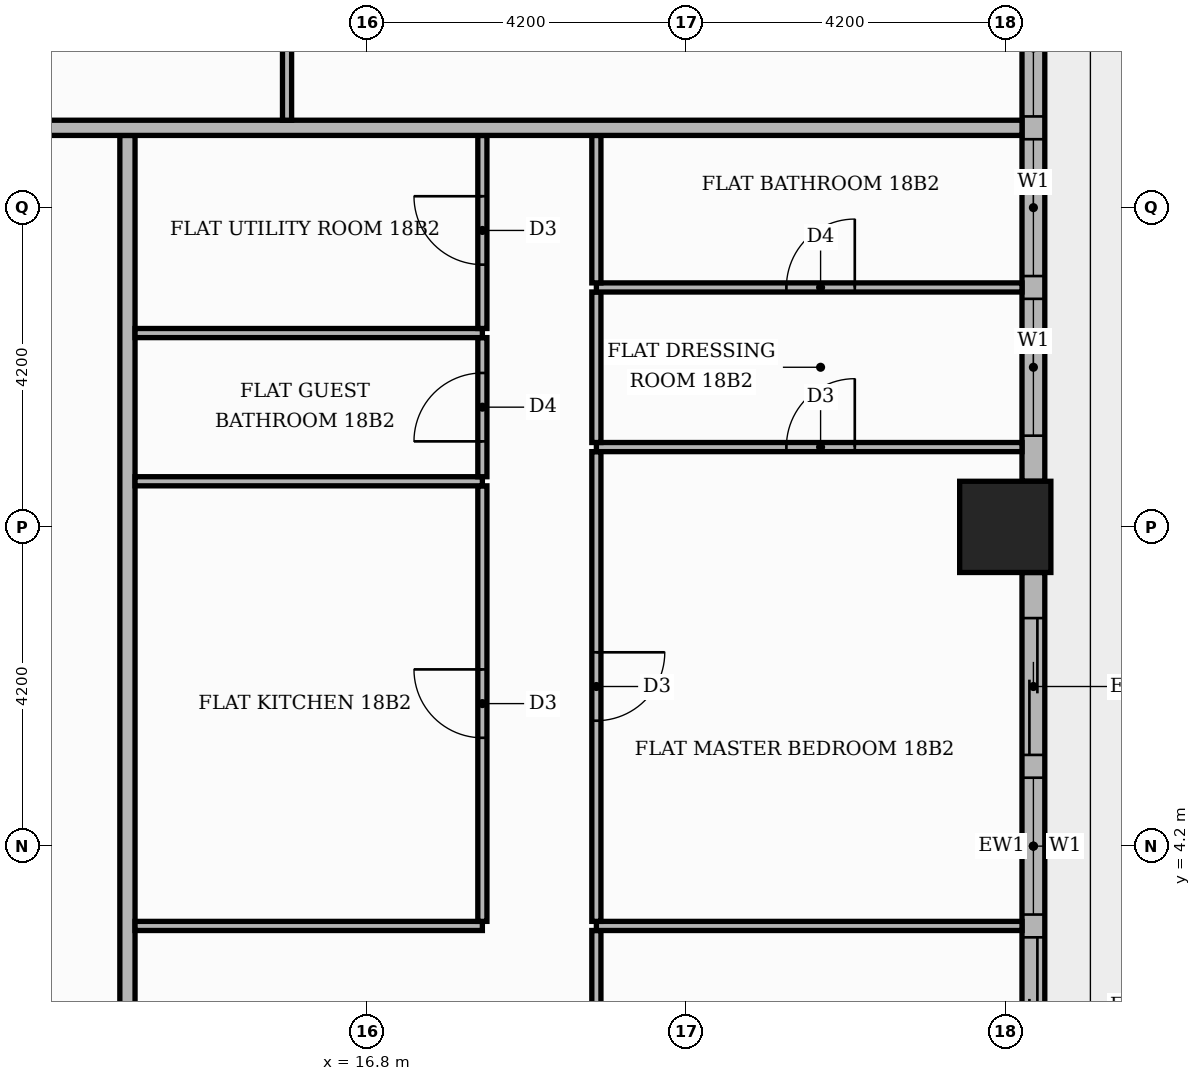
"""IFC4 building model, lengths in metres.
Left out: names, types, materials, properties, quantities, classifications, styles, units other than length and angle.
Written with IfcOpenShell. Run it as: python <this file> out.ifc"""

import sys

from ifc_helpers import new_model, si_unit, direction, frame, frame_2d, origin, origin_2d, place, context, subcontext, project, spatial, rectangle, extrude, element, fill, save


model = new_model("IFC4")
c1 = context("Model", 3, precision=1e-05, world=origin(), true_north=direction((0.0, 1.0)))
c2 = subcontext(c1, "Body", "Model", "MODEL_VIEW")
j1 = project(units=[si_unit("LENGTHUNIT", "METRE"), si_unit("PLANEANGLEUNIT", "RADIAN")], contexts=[c1])
p1 = place(None, origin())
s1 = spatial("IfcSite", under=j1, at=p1, CompositionType="ELEMENT")
p2 = place(p1, origin())
s2 = spatial("IfcBuilding", under=s1, at=p2, CompositionType="ELEMENT")
p3 = place(p2, frame((0.0, 0.0, 79.2)))
s3 = spatial("IfcBuildingStorey", under=s2, at=p3, CompositionType="ELEMENT", Elevation=79.2)
p4 = place(p3, frame((25.2, 8.4, 0.0), z_axis=(0.0, 0.0, 1.0), x_axis=(1.0, 0.0, 0.0)))
e1 = element("IfcColumn", 1, at=p4, inside=s3, PredefinedType="COLUMN", context=c2, shape_type="SweptSolid", body=[
    extrude(rectangle(XDim=1.2, YDim=1.2, at=origin_2d()), origin(), (0.0, 0.0, 1.0), 3.9),
])
p5 = place(p3, frame((25.57, 0.6, 0.0), z_axis=(0.0, 0.0, 1.0), x_axis=(0.0, 1.0, 0.0)))
e2 = element("IfcWall", 2, at=p5, inside=s3, PredefinedType="STANDARD", context=c2, shape_type="SweptSolid", body=[
    extrude(rectangle(XDim=7.2, YDim=0.3, at=frame_2d((3.6, 0.0))), origin(), (0.0, 0.0, 1.0), 3.48),
])
p6 = place(p5, frame((0.6, 0.0, 0.0)))
e3 = element("IfcOpeningElement", 3, at=p6, cuts=e2, PredefinedType="OPENING", context=c2, shape_type="SweptSolid", body=[
    extrude(rectangle(XDim=1.8, YDim=2.4, at=frame_2d((0.9, 1.2))), frame((0.0, 0.16, 0.0), z_axis=(0.0, -1.0, 0.0), x_axis=(1.0, 0.0, 0.0)), (0.0, 0.0, 1.0), 0.32),
])
p7 = place(p5, frame((2.7, 0.0, 0.9)))
e4 = element("IfcOpeningElement", 4, at=p7, cuts=e2, PredefinedType="OPENING", context=c2, shape_type="SweptSolid", body=[
    extrude(rectangle(XDim=1.8, YDim=2.1, at=frame_2d((0.9, 1.05))), frame((0.0, 0.16, 0.0), z_axis=(0.0, -1.0, 0.0), x_axis=(1.0, 0.0, 0.0)), (0.0, 0.0, 1.0), 0.32),
])
p8 = place(p5, frame((4.8, 0.0, 0.0)))
e5 = element("IfcOpeningElement", 5, at=p8, cuts=e2, PredefinedType="OPENING", context=c2, shape_type="SweptSolid", body=[
    extrude(rectangle(XDim=1.8, YDim=2.4, at=frame_2d((0.9, 1.2))), frame((0.0, 0.16, 0.0), z_axis=(0.0, -1.0, 0.0), x_axis=(1.0, 0.0, 0.0)), (0.0, 0.0, 1.0), 0.32),
])
p9 = place(p3, frame((25.57, 9.0, 0.0), z_axis=(0.0, 0.0, 1.0), x_axis=(0.0, 1.0, 0.0)))
e6 = element("IfcWall", 6, at=p9, inside=s3, PredefinedType="STANDARD", context=c2, shape_type="SweptSolid", body=[
    extrude(rectangle(XDim=7.2, YDim=0.3, at=frame_2d((3.6, 0.0))), origin(), (0.0, 0.0, 1.0), 3.48),
])
p10 = place(p9, frame((0.6, 0.0, 0.9)))
e7 = element("IfcOpeningElement", 7, at=p10, cuts=e6, PredefinedType="OPENING", context=c2, shape_type="SweptSolid", body=[
    extrude(rectangle(XDim=1.8, YDim=2.1, at=frame_2d((0.9, 1.05))), frame((0.0, 0.16, 0.0), z_axis=(0.0, -1.0, 0.0), x_axis=(1.0, 0.0, 0.0)), (0.0, 0.0, 1.0), 0.32),
])
p11 = place(p9, frame((2.7, 0.0, 0.9)))
e8 = element("IfcOpeningElement", 8, at=p11, cuts=e6, PredefinedType="OPENING", context=c2, shape_type="SweptSolid", body=[
    extrude(rectangle(XDim=1.8, YDim=2.1, at=frame_2d((0.9, 1.05))), frame((0.0, 0.16, 0.0), z_axis=(0.0, -1.0, 0.0), x_axis=(1.0, 0.0, 0.0)), (0.0, 0.0, 1.0), 0.32),
])
p12 = place(p9, frame((4.8, 0.0, 0.9)))
e9 = element("IfcOpeningElement", 9, at=p12, cuts=e6, PredefinedType="OPENING", context=c2, shape_type="SweptSolid", body=[
    extrude(rectangle(XDim=1.8, YDim=2.1, at=frame_2d((0.9, 1.05))), frame((0.0, 0.16, 0.0), z_axis=(0.0, -1.0, 0.0), x_axis=(1.0, 0.0, 0.0)), (0.0, 0.0, 1.0), 0.32),
])
p13 = place(p3, frame((13.65, -5.15, 0.0), z_axis=(0.0, 0.0, 1.0), x_axis=(0.0, 1.0, 0.0)))
e10 = element("IfcWall", 10, at=p13, inside=s3, PredefinedType="PARTITIONING", context=c2, shape_type="SweptSolid", body=[
    extrude(rectangle(XDim=18.7, YDim=0.2, at=frame_2d((9.35, 0.0))), origin(), (0.0, 0.0, 1.0), 3.48),
])
p14 = place(p13, frame((5.65, 0.0, 0.0)))
e11 = element("IfcOpeningElement", 11, at=p14, cuts=e10, PredefinedType="OPENING", context=c2, shape_type="SweptSolid", body=[
    extrude(rectangle(XDim=1.1, YDim=2.4, at=frame_2d((0.55, 1.2))), frame((0.0, 0.11, 0.0), z_axis=(0.0, -1.0, 0.0), x_axis=(1.0, 0.0, 0.0)), (0.0, 0.0, 1.0), 0.22),
])
p15 = place(p3, frame((19.82, -5.15, 0.0), z_axis=(0.0, 0.0, 1.0), x_axis=(0.0, 1.0, 0.0)))
e12 = element("IfcWall", 12, at=p15, inside=s3, PredefinedType="PARTITIONING", context=c2, shape_type="SweptSolid", body=[
    extrude(rectangle(XDim=8.24, YDim=0.12, at=frame_2d((4.12, 0.0))), origin(), (0.0, 0.0, 1.0), 3.48),
])
p16 = place(p15, frame((3.6, 0.0, 0.0)))
e13 = element("IfcOpeningElement", 13, at=p16, cuts=e12, PredefinedType="OPENING", context=c2, shape_type="SweptSolid", body=[
    extrude(rectangle(XDim=1.0, YDim=2.1, at=frame_2d((0.5, 1.05))), frame((0.0, 0.07, 0.0), z_axis=(0.0, -1.0, 0.0), x_axis=(1.0, 0.0, 0.0)), (0.0, 0.0, 1.0), 0.14),
])
p17 = place(p3, frame((13.75, 3.15, 0.0), z_axis=(0.0, 0.0, 1.0), x_axis=(1.0, 0.0, 0.0)))
e14 = element("IfcWall", 14, at=p17, inside=s3, PredefinedType="PARTITIONING", context=c2, shape_type="SweptSolid", body=[
    extrude(rectangle(XDim=4.57, YDim=0.12, at=frame_2d((2.285, 0.0))), origin(), (0.0, 0.0, 1.0), 3.48),
])
p18 = place(p3, frame((19.82, 3.15, 0.0), z_axis=(0.0, 0.0, 1.0), x_axis=(1.0, 0.0, 0.0)))
e15 = element("IfcWall", 15, at=p18, inside=s3, PredefinedType="PARTITIONING", context=c2, shape_type="SweptSolid", body=[
    extrude(rectangle(XDim=5.6, YDim=0.12, at=frame_2d((2.8, 0.0))), origin(), (0.0, 0.0, 1.0), 3.48),
])
p19 = place(p3, frame((18.32, 3.21, 0.0), z_axis=(0.0, 0.0, 1.0), x_axis=(0.0, 1.0, 0.0)))
e16 = element("IfcWall", 16, at=p19, inside=s3, PredefinedType="PARTITIONING", context=c2, shape_type="SweptSolid", body=[
    extrude(rectangle(XDim=5.73, YDim=0.12, at=frame_2d((2.865, 0.0))), origin(), (0.0, 0.0, 1.0), 3.48),
])
p20 = place(p19, frame((2.415, 0.0, 0.0)))
e17 = element("IfcOpeningElement", 17, at=p20, cuts=e16, PredefinedType="OPENING", context=c2, shape_type="SweptSolid", body=[
    extrude(rectangle(XDim=0.9, YDim=2.1, at=frame_2d((0.45, 1.05))), frame((0.0, 0.07, 0.0), z_axis=(0.0, -1.0, 0.0), x_axis=(1.0, 0.0, 0.0)), (0.0, 0.0, 1.0), 0.14),
])
p21 = place(p3, frame((19.82, 3.21, 0.0), z_axis=(0.0, 0.0, 1.0), x_axis=(0.0, 1.0, 0.0)))
e18 = element("IfcWall", 18, at=p21, inside=s3, PredefinedType="PARTITIONING", context=c2, shape_type="SweptSolid", body=[
    extrude(rectangle(XDim=6.18, YDim=0.12, at=frame_2d((3.09, 0.0))), origin(), (0.0, 0.0, 1.0), 3.48),
])
p22 = place(p21, frame((2.64, 0.0, 0.0)))
e19 = element("IfcOpeningElement", 19, at=p22, cuts=e18, PredefinedType="OPENING", context=c2, shape_type="SweptSolid", body=[
    extrude(rectangle(XDim=0.9, YDim=2.1, at=frame_2d((0.45, 1.05))), frame((0.0, 0.07, 0.0), z_axis=(0.0, -1.0, 0.0), x_axis=(1.0, 0.0, 0.0)), (0.0, 0.0, 1.0), 0.14),
])
p23 = place(p3, frame((13.75, 9.0, 0.0), z_axis=(0.0, 0.0, 1.0), x_axis=(1.0, 0.0, 0.0)))
e20 = element("IfcWall", 20, at=p23, inside=s3, PredefinedType="PARTITIONING", context=c2, shape_type="SweptSolid", body=[
    extrude(rectangle(XDim=4.57, YDim=0.12, at=frame_2d((2.285, 0.0))), origin(), (0.0, 0.0, 1.0), 3.48),
])
p24 = place(p3, frame((18.32, 9.06, 0.0), z_axis=(0.0, 0.0, 1.0), x_axis=(0.0, 1.0, 0.0)))
e21 = element("IfcWall", 21, at=p24, inside=s3, PredefinedType="PARTITIONING", context=c2, shape_type="SweptSolid", body=[
    extrude(rectangle(XDim=1.83, YDim=0.12, at=frame_2d((0.915, 0.0))), origin(), (0.0, 0.0, 1.0), 3.48),
])
p25 = place(p24, frame((0.465, 0.0, 0.0)))
e22 = element("IfcOpeningElement", 22, at=p25, cuts=e21, PredefinedType="OPENING", context=c2, shape_type="SweptSolid", body=[
    extrude(rectangle(XDim=0.9, YDim=2.1, at=frame_2d((0.45, 1.05))), frame((0.0, 0.07, 0.0), z_axis=(0.0, -1.0, 0.0), x_axis=(1.0, 0.0, 0.0)), (0.0, 0.0, 1.0), 0.14),
])
p26 = place(p3, frame((19.82, 9.45, 0.0), z_axis=(0.0, 0.0, 1.0), x_axis=(1.0, 0.0, 0.0)))
e23 = element("IfcWall", 23, at=p26, inside=s3, PredefinedType="PARTITIONING", context=c2, shape_type="SweptSolid", body=[
    extrude(rectangle(XDim=5.6, YDim=0.12, at=frame_2d((2.8, 0.0))), origin(), (0.0, 0.0, 1.0), 3.48),
])
p27 = place(p26, frame((2.5, 0.0, 0.0)))
e24 = element("IfcOpeningElement", 24, at=p27, cuts=e23, PredefinedType="OPENING", context=c2, shape_type="SweptSolid", body=[
    extrude(rectangle(XDim=0.9, YDim=2.1, at=frame_2d((0.45, 1.05))), frame((0.0, 0.07, 0.0), z_axis=(0.0, -1.0, 0.0), x_axis=(1.0, 0.0, 0.0)), (0.0, 0.0, 1.0), 0.14),
])
p28 = place(p3, frame((19.82, 9.51, 0.0), z_axis=(0.0, 0.0, 1.0), x_axis=(0.0, 1.0, 0.0)))
e25 = element("IfcWall", 25, at=p28, inside=s3, PredefinedType="PARTITIONING", context=c2, shape_type="SweptSolid", body=[
    extrude(rectangle(XDim=1.98, YDim=0.12, at=frame_2d((0.99, 0.0))), origin(), (0.0, 0.0, 1.0), 3.48),
])
p29 = place(p3, frame((13.75, 10.95, 0.0), z_axis=(0.0, 0.0, 1.0), x_axis=(1.0, 0.0, 0.0)))
e26 = element("IfcWall", 26, at=p29, inside=s3, PredefinedType="PARTITIONING", context=c2, shape_type="SweptSolid", body=[
    extrude(rectangle(XDim=4.57, YDim=0.12, at=frame_2d((2.285, 0.0))), origin(), (0.0, 0.0, 1.0), 3.48),
])
p30 = place(p3, frame((18.32, 11.01, 0.0), z_axis=(0.0, 0.0, 1.0), x_axis=(0.0, 1.0, 0.0)))
e27 = element("IfcWall", 27, at=p30, inside=s3, PredefinedType="PARTITIONING", context=c2, shape_type="SweptSolid", body=[
    extrude(rectangle(XDim=2.54, YDim=0.12, at=frame_2d((1.27, 0.0))), origin(), (0.0, 0.0, 1.0), 3.48),
])
p31 = place(p30, frame((0.84, 0.0, 0.0)))
e28 = element("IfcOpeningElement", 28, at=p31, cuts=e27, PredefinedType="OPENING", context=c2, shape_type="SweptSolid", body=[
    extrude(rectangle(XDim=0.9, YDim=2.1, at=frame_2d((0.45, 1.05))), frame((0.0, 0.07, 0.0), z_axis=(0.0, -1.0, 0.0), x_axis=(1.0, 0.0, 0.0)), (0.0, 0.0, 1.0), 0.14),
])
p32 = place(p3, frame((19.82, 11.55, 0.0), z_axis=(0.0, 0.0, 1.0), x_axis=(1.0, 0.0, 0.0)))
e29 = element("IfcWall", 29, at=p32, inside=s3, PredefinedType="PARTITIONING", context=c2, shape_type="SweptSolid", body=[
    extrude(rectangle(XDim=5.6, YDim=0.12, at=frame_2d((2.8, 0.0))), origin(), (0.0, 0.0, 1.0), 3.48),
])
p33 = place(p32, frame((2.5, 0.0, 0.0)))
e30 = element("IfcOpeningElement", 30, at=p33, cuts=e29, PredefinedType="OPENING", context=c2, shape_type="SweptSolid", body=[
    extrude(rectangle(XDim=0.9, YDim=2.1, at=frame_2d((0.45, 1.05))), frame((0.0, 0.07, 0.0), z_axis=(0.0, -1.0, 0.0), x_axis=(1.0, 0.0, 0.0)), (0.0, 0.0, 1.0), 0.14),
])
p34 = place(p3, frame((19.82, 11.61, 0.0), z_axis=(0.0, 0.0, 1.0), x_axis=(0.0, 1.0, 0.0)))
e31 = element("IfcWall", 31, at=p34, inside=s3, PredefinedType="PARTITIONING", context=c2, shape_type="SweptSolid", body=[
    extrude(rectangle(XDim=1.94, YDim=0.12, at=frame_2d((0.97, 0.0))), origin(), (0.0, 0.0, 1.0), 3.48),
])
p35 = place(p3, frame((-13.65, 13.65, 0.0), z_axis=(0.0, 0.0, 1.0), x_axis=(1.0, 0.0, 0.0)))
e32 = element("IfcWall", 32, at=p35, inside=s3, PredefinedType="PARTITIONING", context=c2, shape_type="SweptSolid", body=[
    extrude(rectangle(XDim=39.07, YDim=0.2, at=frame_2d((19.535, 0.0))), origin(), (0.0, 0.0, 1.0), 3.48),
])
p36 = place(p35, frame((24.65, 0.0, 0.0)))
e33 = element("IfcOpeningElement", 33, at=p36, cuts=e32, PredefinedType="OPENING", context=c2, shape_type="SweptSolid", body=[
    extrude(rectangle(XDim=1.1, YDim=2.4, at=frame_2d((0.55, 1.2))), frame((0.0, 0.11, 0.0), z_axis=(0.0, -1.0, 0.0), x_axis=(1.0, 0.0, 0.0)), (0.0, 0.0, 1.0), 0.22),
])
p37 = place(p35, frame((14.15, 0.0, 0.0)))
e34 = element("IfcOpeningElement", 34, at=p37, cuts=e32, PredefinedType="OPENING", context=c2, shape_type="SweptSolid", body=[
    extrude(rectangle(XDim=1.1, YDim=2.4, at=frame_2d((0.55, 1.2))), frame((0.0, 0.11, 0.0), z_axis=(0.0, -1.0, 0.0), x_axis=(1.0, 0.0, 0.0)), (0.0, 0.0, 1.0), 0.22),
])
p38 = place(p3, frame((15.75, 13.75, 0.0), z_axis=(0.0, 0.0, 1.0), x_axis=(0.0, 1.0, 0.0)))
e35 = element("IfcWall", 35, at=p38, inside=s3, PredefinedType="PARTITIONING", context=c2, shape_type="SweptSolid", body=[
    extrude(rectangle(XDim=6.01, YDim=0.12, at=frame_2d((3.005, 0.0))), origin(), (0.0, 0.0, 1.0), 3.48),
])
p39 = place(p38, frame((2.485, 0.0, 0.0)))
e36 = element("IfcOpeningElement", 36, at=p39, cuts=e35, PredefinedType="OPENING", context=c2, shape_type="SweptSolid", body=[
    extrude(rectangle(XDim=1.0, YDim=2.1, at=frame_2d((0.5, 1.05))), frame((0.0, 0.07, 0.0), z_axis=(0.0, -1.0, 0.0), x_axis=(1.0, 0.0, 0.0)), (0.0, 0.0, 1.0), 0.14),
])
p40 = place(p6, origin())
e37 = element("IfcDoor", 37, at=p40, inside=s3, OperationType="SLIDING_TO_LEFT", PredefinedType="DOOR", context=c2, shape_type="SweptSolid", body=[
    extrude(rectangle(XDim=1.8, YDim=2.4, at=frame_2d((0.9, 1.2))), frame((0.0, 0.025, 0.0), z_axis=(0.0, -1.0, 0.0), x_axis=(1.0, 0.0, 0.0)), (0.0, 0.0, 1.0), 0.05),
])
fill(e3, e37)
p41 = place(p7, origin())
e38 = element("IfcWindow", 38, at=p41, inside=s3, PartitioningType="SINGLE_PANEL", PredefinedType="WINDOW", context=c2, shape_type="SweptSolid", body=[
    extrude(rectangle(XDim=1.8, YDim=2.1, at=frame_2d((0.9, 1.05))), frame((0.0, 0.03, 0.0), z_axis=(0.0, -1.0, 0.0), x_axis=(1.0, 0.0, 0.0)), (0.0, 0.0, 1.0), 0.06),
])
fill(e4, e38)
p42 = place(p8, origin())
e39 = element("IfcDoor", 39, at=p42, inside=s3, OperationType="SLIDING_TO_RIGHT", PredefinedType="DOOR", context=c2, shape_type="SweptSolid", body=[
    extrude(rectangle(XDim=1.8, YDim=2.4, at=frame_2d((0.9, 1.2))), frame((0.0, 0.025, 0.0), z_axis=(0.0, -1.0, 0.0), x_axis=(1.0, 0.0, 0.0)), (0.0, 0.0, 1.0), 0.05),
])
fill(e5, e39)
p43 = place(p10, origin())
e40 = element("IfcWindow", 40, at=p43, inside=s3, PartitioningType="SINGLE_PANEL", PredefinedType="WINDOW", context=c2, shape_type="SweptSolid", body=[
    extrude(rectangle(XDim=1.8, YDim=2.1, at=frame_2d((0.9, 1.05))), frame((0.0, 0.03, 0.0), z_axis=(0.0, -1.0, 0.0), x_axis=(1.0, 0.0, 0.0)), (0.0, 0.0, 1.0), 0.06),
])
fill(e7, e40)
p44 = place(p11, origin())
e41 = element("IfcWindow", 41, at=p44, inside=s3, PartitioningType="SINGLE_PANEL", PredefinedType="WINDOW", context=c2, shape_type="SweptSolid", body=[
    extrude(rectangle(XDim=1.8, YDim=2.1, at=frame_2d((0.9, 1.05))), frame((0.0, 0.03, 0.0), z_axis=(0.0, -1.0, 0.0), x_axis=(1.0, 0.0, 0.0)), (0.0, 0.0, 1.0), 0.06),
])
fill(e8, e41)
p45 = place(p12, origin())
e42 = element("IfcWindow", 42, at=p45, inside=s3, PartitioningType="SINGLE_PANEL", PredefinedType="WINDOW", context=c2, shape_type="SweptSolid", body=[
    extrude(rectangle(XDim=1.8, YDim=2.1, at=frame_2d((0.9, 1.05))), frame((0.0, 0.03, 0.0), z_axis=(0.0, -1.0, 0.0), x_axis=(1.0, 0.0, 0.0)), (0.0, 0.0, 1.0), 0.06),
])
fill(e9, e42)
p46 = place(p20, origin())
e43 = element("IfcDoor", 43, at=p46, inside=s3, OperationType="SINGLE_SWING_RIGHT", PredefinedType="DOOR", context=c2, shape_type="SweptSolid", body=[
    extrude(rectangle(XDim=0.9, YDim=2.1, at=frame_2d((0.45, 1.05))), frame((0.0, 0.025, 0.0), z_axis=(0.0, -1.0, 0.0), x_axis=(1.0, 0.0, 0.0)), (0.0, 0.0, 1.0), 0.05),
])
fill(e17, e43)
p47 = place(p25, origin())
e44 = element("IfcDoor", 44, at=p47, inside=s3, OperationType="SINGLE_SWING_LEFT", PredefinedType="DOOR", context=c2, shape_type="SweptSolid", body=[
    extrude(rectangle(XDim=0.9, YDim=2.1, at=frame_2d((0.45, 1.05))), frame((0.0, 0.025, 0.0), z_axis=(0.0, -1.0, 0.0), x_axis=(1.0, 0.0, 0.0)), (0.0, 0.0, 1.0), 0.05),
])
fill(e22, e44)
p48 = place(p31, origin())
e45 = element("IfcDoor", 45, at=p48, inside=s3, OperationType="SINGLE_SWING_RIGHT", PredefinedType="DOOR", context=c2, shape_type="SweptSolid", body=[
    extrude(rectangle(XDim=0.9, YDim=2.1, at=frame_2d((0.45, 1.05))), frame((0.0, 0.025, 0.0), z_axis=(0.0, -1.0, 0.0), x_axis=(1.0, 0.0, 0.0)), (0.0, 0.0, 1.0), 0.05),
])
fill(e28, e45)
p49 = place(p22, frame((0.9, 0.0, 0.0), z_axis=(0.0, 0.0, 1.0), x_axis=(-1.0, 0.0, 0.0)))
e46 = element("IfcDoor", 46, at=p49, inside=s3, OperationType="SINGLE_SWING_RIGHT", PredefinedType="DOOR", context=c2, shape_type="SweptSolid", body=[
    extrude(rectangle(XDim=0.9, YDim=2.1, at=frame_2d((0.45, 1.05))), frame((0.0, 0.025, 0.0), z_axis=(0.0, -1.0, 0.0), x_axis=(1.0, 0.0, 0.0)), (0.0, 0.0, 1.0), 0.05),
])
fill(e19, e46)
p50 = place(p27, origin())
e47 = element("IfcDoor", 47, at=p50, inside=s3, OperationType="SINGLE_SWING_RIGHT", PredefinedType="DOOR", context=c2, shape_type="SweptSolid", body=[
    extrude(rectangle(XDim=0.9, YDim=2.1, at=frame_2d((0.45, 1.05))), frame((0.0, 0.025, 0.0), z_axis=(0.0, -1.0, 0.0), x_axis=(1.0, 0.0, 0.0)), (0.0, 0.0, 1.0), 0.05),
])
fill(e24, e47)
p51 = place(p33, origin())
e48 = element("IfcDoor", 48, at=p51, inside=s3, OperationType="SINGLE_SWING_RIGHT", PredefinedType="DOOR", context=c2, shape_type="SweptSolid", body=[
    extrude(rectangle(XDim=0.9, YDim=2.1, at=frame_2d((0.45, 1.05))), frame((0.0, 0.025, 0.0), z_axis=(0.0, -1.0, 0.0), x_axis=(1.0, 0.0, 0.0)), (0.0, 0.0, 1.0), 0.05),
])
fill(e30, e48)
save(model, sys.argv[1])
